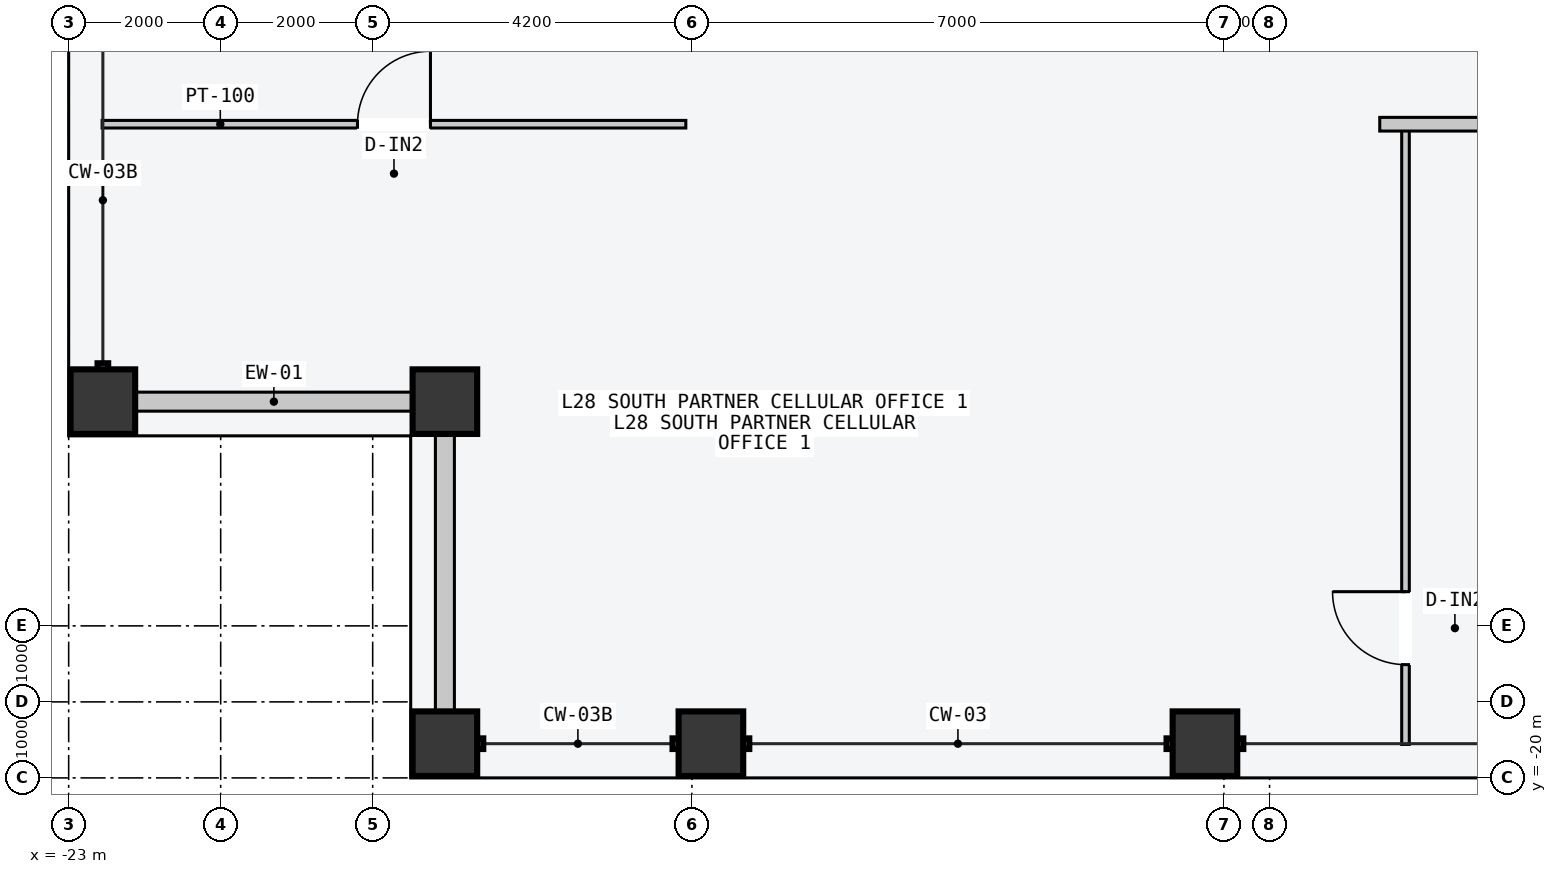
"""IFC4 building model, lengths in metres.
Left out: names, types, materials, properties, quantities, classifications, styles, units other than length and angle.
Written with IfcOpenShell. Run it as: python <this file> out.ifc"""

import sys

from ifc_helpers import new_model, si_unit, direction, frame, frame_2d, origin, origin_2d, place, context, subcontext, project, spatial, rectangle, hollow_rectangle, extrude, element, fill, save


model = new_model("IFC4")
c1 = context("Model", 3, precision=1e-05, world=origin(), true_north=direction((0.0, 1.0)))
c2 = subcontext(c1, "Body", "Model", "MODEL_VIEW")
j1 = project(units=[si_unit("LENGTHUNIT", "METRE"), si_unit("PLANEANGLEUNIT", "RADIAN")], contexts=[c1])
p1 = place(None, origin())
s1 = spatial("IfcSite", under=j1, at=p1, CompositionType="ELEMENT")
p2 = place(p1, origin())
s2 = spatial("IfcBuilding", under=s1, at=p2, CompositionType="ELEMENT")
p3 = place(p2, frame((0.0, 0.0, 109.8)))
s3 = spatial("IfcBuildingStorey", under=s2, at=p3, CompositionType="ELEMENT", Elevation=109.8)
for number, where, z_axis, x_axis in (
    (1, (-18.05, -19.55, 0.0), (0.0, 0.0, 1.0), (1.0, 0.0, 0.0)),
    (2, (-14.55, -19.55, 0.0), (0.0, 0.0, 1.0), (1.0, 0.0, 0.0)),
    (3, (-8.05, -19.55, 0.0), (0.0, 0.0, 1.0), (1.0, 0.0, 0.0)),
    (4, (-22.55, -15.05, 0.0), (0.0, 0.0, 1.0), (0.0, 1.0, 0.0)),
    (5, (-18.05, -15.05, 0.0), (0.0, 0.0, 1.0), (1.0, 0.0, 0.0)),
):
    element("IfcColumn", number, at=place(p3, frame(where, z_axis=z_axis, x_axis=x_axis)), inside=s3, PredefinedType="COLUMN", context=c2, shape_type="SweptSolid", body=[
        extrude(hollow_rectangle(XDim=0.85, YDim=0.85, WallThickness=0.04, at=origin_2d()), origin(), (0.0, 0.0, 1.0), 3.6),
    ])
for number, where, z_axis, x_axis in (
    (6, (-22.115, -15.05, 0.0), (0.0, 0.0, 1.0), (1.0, 0.0, 0.0)),
    (7, (-18.05, -19.115, 0.0), (0.0, 0.0, 1.0), (0.0, 1.0, 0.0)),
):
    element("IfcWall", number, at=place(p3, frame(where, z_axis=z_axis, x_axis=x_axis)), inside=s3, PredefinedType="STANDARD", context=c2, shape_type="SweptSolid", body=[
        extrude(rectangle(XDim=3.63, YDim=0.25, at=frame_2d((1.815, 0.0))), origin(), (0.0, 0.0, 1.0), 2.75),
    ])
p4 = place(p3, frame((-5.411, -19.56, 0.0), z_axis=(0.0, 0.0, 1.0), x_axis=(0.0, 1.0, 0.0)))
e8 = element("IfcWall", 8, at=p4, inside=s3, PredefinedType="PARTITIONING", context=c2, shape_type="SweptSolid", body=[
    extrude(rectangle(XDim=8.1, YDim=0.1, at=frame_2d((4.05, 0.0))), origin(), (0.0, 0.0, 1.0), 3.4),
])
p5 = place(p4, frame((1.05, 0.0, 0.0)))
e9 = element("IfcOpeningElement", 9, at=p5, cuts=e8, PredefinedType="OPENING", context=c2, shape_type="SweptSolid", body=[
    extrude(rectangle(XDim=0.96, YDim=2.18, at=frame_2d((0.48, 1.09))), frame((0.0, 0.06, 0.0), z_axis=(0.0, -1.0, 0.0), x_axis=(1.0, 0.0, 0.0)), (0.0, 0.0, 1.0), 0.12),
])
p6 = place(p3, frame((-5.75, -11.4, 0.0), z_axis=(0.0, 0.0, 1.0), x_axis=(1.0, 0.0, 0.0)))
e10 = element("IfcWall", 10, at=p6, inside=s3, PredefinedType="PARTITIONING", context=c2, shape_type="SweptSolid", body=[
    extrude(rectangle(XDim=11.5, YDim=0.18, at=frame_2d((5.75, 0.0))), origin(), (0.0, 0.0, 1.0), 3.4),
])
p7 = place(p6, frame((5.299, 0.0, 0.0)))
e11 = element("IfcOpeningElement", 11, at=p7, cuts=e10, PredefinedType="OPENING", context=c2, shape_type="SweptSolid", body=[
    extrude(rectangle(XDim=1.24, YDim=2.24, at=frame_2d((0.62, 1.12))), frame((0.0, 0.1, 0.0), z_axis=(0.0, -1.0, 0.0), x_axis=(1.0, 0.0, 0.0)), (0.0, 0.0, 1.0), 0.2),
])
p8 = place(p3, frame((-22.56, -11.4, 0.0), z_axis=(0.0, 0.0, 1.0), x_axis=(1.0, 0.0, 0.0)))
e12 = element("IfcWall", 12, at=p8, inside=s3, PredefinedType="PARTITIONING", context=c2, shape_type="SweptSolid", body=[
    extrude(rectangle(XDim=7.68, YDim=0.1, at=frame_2d((3.84, 0.0))), origin(), (0.0, 0.0, 1.0), 3.4),
])
p9 = place(p8, frame((3.36, 0.0, 0.0)))
e13 = element("IfcOpeningElement", 13, at=p9, cuts=e12, PredefinedType="OPENING", context=c2, shape_type="SweptSolid", body=[
    extrude(rectangle(XDim=0.96, YDim=2.18, at=frame_2d((0.48, 1.09))), frame((0.0, 0.06, 0.0), z_axis=(0.0, -1.0, 0.0), x_axis=(1.0, 0.0, 0.0)), (0.0, 0.0, 1.0), 0.12),
])
p10 = place(p5, origin())
e14 = element("IfcDoor", 14, at=p10, inside=s3, OperationType="SINGLE_SWING_RIGHT", PredefinedType="DOOR", context=c2, shape_type="SweptSolid", body=[
    extrude(rectangle(XDim=0.96, YDim=2.18, at=frame_2d((0.48, 1.09))), frame((0.0, 0.025, 0.0), z_axis=(0.0, -1.0, 0.0), x_axis=(1.0, 0.0, 0.0)), (0.0, 0.0, 1.0), 0.05),
])
fill(e9, e14)
p11 = place(p9, origin())
e15 = element("IfcDoor", 15, at=p11, inside=s3, OperationType="SINGLE_SWING_RIGHT", PredefinedType="DOOR", context=c2, shape_type="SweptSolid", body=[
    extrude(rectangle(XDim=0.96, YDim=2.18, at=frame_2d((0.48, 1.09))), frame((0.0, 0.025, 0.0), z_axis=(0.0, -1.0, 0.0), x_axis=(1.0, 0.0, 0.0)), (0.0, 0.0, 1.0), 0.05),
])
fill(e13, e15)
save(model, sys.argv[1])
